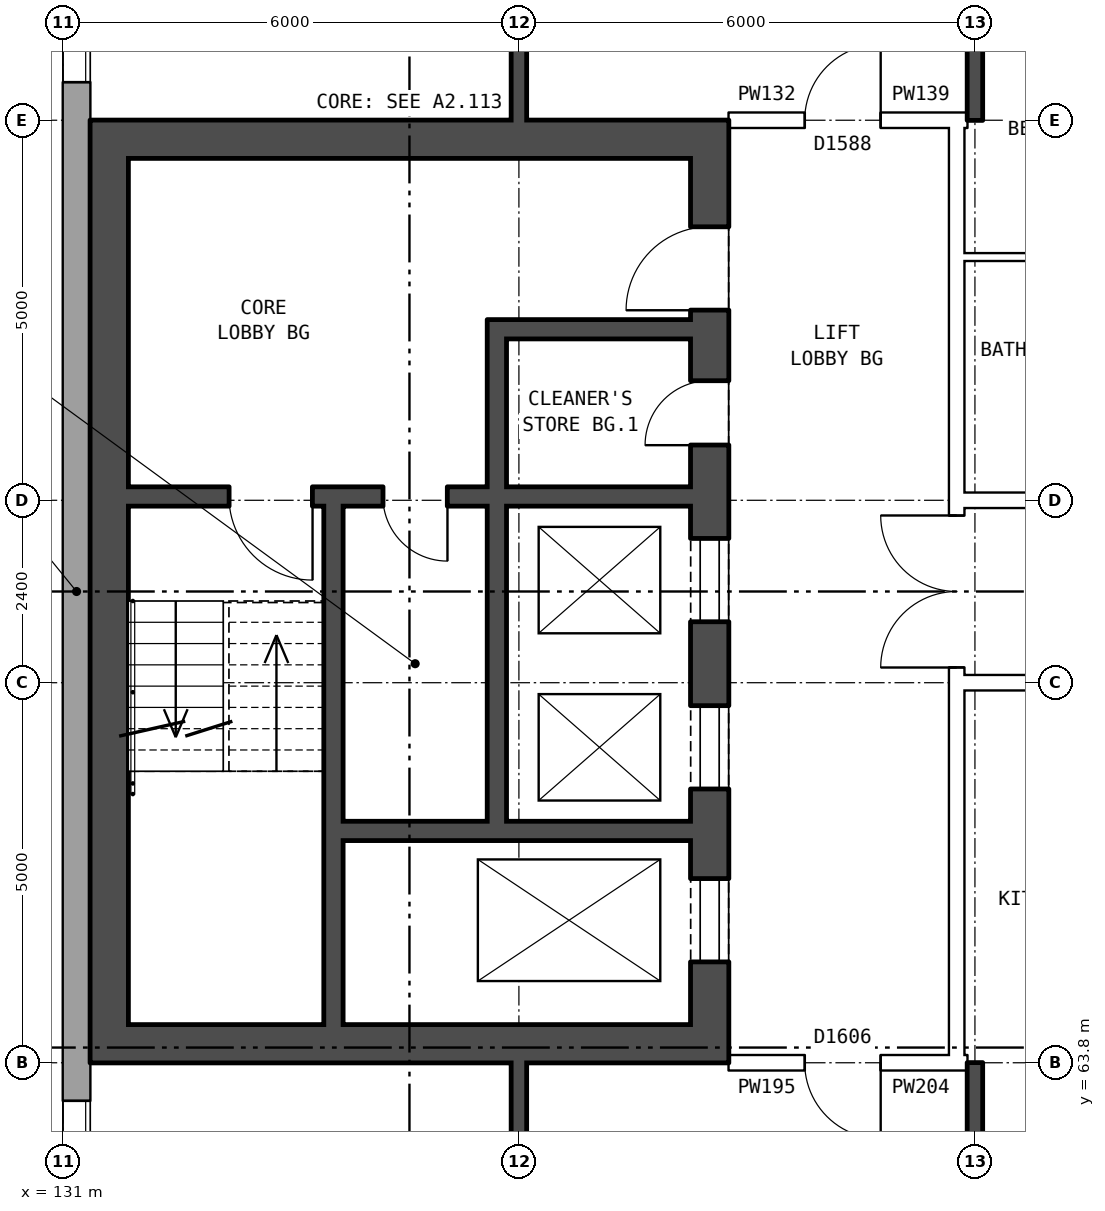
"""IFC4 building model, lengths in metres.
Left out: names, types, materials, properties, quantities, classifications, styles, units other than length and angle.
Written with IfcOpenShell. Run it as: python <this file> out.ifc"""

import sys

from ifc_helpers import new_model, si_unit, direction, frame, frame_2d, origin, place, context, subcontext, project, spatial, rectangle, extrude, element, fill, save


model = new_model("IFC4")
c1 = context("Model", 3, precision=1e-05, world=origin(), true_north=direction((0.0, 1.0)))
c2 = subcontext(c1, "Body", "Model", "MODEL_VIEW")
j1 = project(units=[si_unit("LENGTHUNIT", "METRE"), si_unit("PLANEANGLEUNIT", "RADIAN")], contexts=[c1])
p1 = place(None, origin())
s1 = spatial("IfcSite", under=j1, at=p1, CompositionType="ELEMENT")
p2 = place(p1, origin())
s2 = spatial("IfcBuilding", under=s1, at=p2, CompositionType="ELEMENT")
p3 = place(p2, frame((0.0, 0.0, 154.7)))
s3 = spatial("IfcBuildingStorey", under=s2, at=p3, CompositionType="ELEMENT", Elevation=154.7)
p4 = place(p3, frame((131.18, 82.925, 0.0), z_axis=(0.0, 0.0, 1.0), x_axis=(0.0, -1.0, 0.0)))
e1 = element("IfcWall", 1, at=p4, inside=s3, PredefinedType="STANDARD", context=c2, shape_type="SweptSolid", body=[
    extrude(rectangle(XDim=25.851, YDim=0.36, at=frame_2d((12.925, 0.0))), origin(), (0.0, 0.0, 1.0), 2.85),
])
p5 = place(p4, frame((1.625, 0.0, 0.8)))
e2 = element("IfcOpeningElement", 2, at=p5, cuts=e1, PredefinedType="OPENING", context=c2, shape_type="SweptSolid", body=[
    extrude(rectangle(XDim=1.6, YDim=1.8, at=frame_2d((0.8, 0.9))), frame((0.0, 0.19, 0.0), z_axis=(0.0, -1.0, 0.0), x_axis=(1.0, 0.0, 0.0)), (0.0, 0.0, 1.0), 0.38),
])
p6 = place(p4, frame((4.625, 0.0, 0.8)))
e3 = element("IfcOpeningElement", 3, at=p6, cuts=e1, PredefinedType="OPENING", context=c2, shape_type="SweptSolid", body=[
    extrude(rectangle(XDim=1.6, YDim=1.8, at=frame_2d((0.8, 0.9))), frame((0.0, 0.19, 0.0), z_axis=(0.0, -1.0, 0.0), x_axis=(1.0, 0.0, 0.0)), (0.0, 0.0, 1.0), 0.38),
])
p7 = place(p4, frame((19.625, 0.0, 0.8)))
e4 = element("IfcOpeningElement", 4, at=p7, cuts=e1, PredefinedType="OPENING", context=c2, shape_type="SweptSolid", body=[
    extrude(rectangle(XDim=1.6, YDim=1.8, at=frame_2d((0.8, 0.9))), frame((0.0, 0.19, 0.0), z_axis=(0.0, -1.0, 0.0), x_axis=(1.0, 0.0, 0.0)), (0.0, 0.0, 1.0), 0.38),
])
p8 = place(p4, frame((22.625, 0.0, 0.8)))
e5 = element("IfcOpeningElement", 5, at=p8, cuts=e1, PredefinedType="OPENING", context=c2, shape_type="SweptSolid", body=[
    extrude(rectangle(XDim=1.6, YDim=1.8, at=frame_2d((0.8, 0.9))), frame((0.0, 0.19, 0.0), z_axis=(0.0, -1.0, 0.0), x_axis=(1.0, 0.0, 0.0)), (0.0, 0.0, 1.0), 0.38),
])
p9 = place(p3, frame((139.51, 63.8, 0.0), z_axis=(0.0, 0.0, 1.0), x_axis=(0.0, 1.0, 0.0)))
e6 = element("IfcWall", 6, at=p9, inside=s3, PredefinedType="SHEAR", context=c2, shape_type="SweptSolid", body=[
    extrude(rectangle(XDim=12.4, YDim=0.5, at=frame_2d((6.2, 0.0))), origin(), (0.0, 0.0, 1.0), 2.85),
])
p10 = place(p9, frame((1.325, 0.0, 0.0)))
e7 = element("IfcOpeningElement", 7, at=p10, cuts=e6, PredefinedType="OPENING", context=c2, shape_type="SweptSolid", body=[
    extrude(rectangle(XDim=1.1, YDim=2.1, at=frame_2d((0.55, 1.05))), frame((0.0, 0.26, 0.0), z_axis=(0.0, -1.0, 0.0), x_axis=(1.0, 0.0, 0.0)), (0.0, 0.0, 1.0), 0.52),
])
p11 = place(p9, frame((3.6, 0.0, 0.0)))
e8 = element("IfcOpeningElement", 8, at=p11, cuts=e6, PredefinedType="OPENING", context=c2, shape_type="SweptSolid", body=[
    extrude(rectangle(XDim=1.1, YDim=2.1, at=frame_2d((0.55, 1.05))), frame((0.0, 0.26, 0.0), z_axis=(0.0, -1.0, 0.0), x_axis=(1.0, 0.0, 0.0)), (0.0, 0.0, 1.0), 0.52),
])
p12 = place(p9, frame((5.8, 0.0, 0.0)))
e9 = element("IfcOpeningElement", 9, at=p12, cuts=e6, PredefinedType="OPENING", context=c2, shape_type="SweptSolid", body=[
    extrude(rectangle(XDim=1.1, YDim=2.1, at=frame_2d((0.55, 1.05))), frame((0.0, 0.26, 0.0), z_axis=(0.0, -1.0, 0.0), x_axis=(1.0, 0.0, 0.0)), (0.0, 0.0, 1.0), 0.52),
])
p13 = place(p9, frame((9.9, 0.0, 0.0)))
e10 = element("IfcOpeningElement", 10, at=p13, cuts=e6, PredefinedType="OPENING", context=c2, shape_type="SweptSolid", body=[
    extrude(rectangle(XDim=1.1, YDim=2.1, at=frame_2d((0.55, 1.05))), frame((0.0, 0.26, 0.0), z_axis=(0.0, -1.0, 0.0), x_axis=(1.0, 0.0, 0.0)), (0.0, 0.0, 1.0), 0.52),
])
p14 = place(p9, frame((8.125, 0.0, 0.0)))
e11 = element("IfcOpeningElement", 11, at=p14, cuts=e6, PredefinedType="OPENING", context=c2, shape_type="SweptSolid", body=[
    extrude(rectangle(XDim=0.85, YDim=2.1, at=frame_2d((0.425, 1.05))), frame((0.0, 0.26, 0.0), z_axis=(0.0, -1.0, 0.0), x_axis=(1.0, 0.0, 0.0)), (0.0, 0.0, 1.0), 0.52),
])
p15 = place(p3, frame((131.61, 63.8, 0.0), z_axis=(0.0, 0.0, 1.0), x_axis=(0.0, 1.0, 0.0)))
e12 = element("IfcWall", 12, at=p15, inside=s3, PredefinedType="SHEAR", context=c2, shape_type="SweptSolid", body=[
    extrude(rectangle(XDim=12.4, YDim=0.5, at=frame_2d((6.2, 0.0))), origin(), (0.0, 0.0, 1.0), 2.85),
])
for number, where, z_axis, x_axis in (
    (13, (139.26, 64.05, 0.0), (0.0, 0.0, 1.0), (-1.0, 0.0, 0.0)),
    (14, (139.26, 75.95, 0.0), (0.0, 0.0, 1.0), (-1.0, 0.0, 0.0)),
):
    element("IfcWall", number, at=place(p3, frame(where, z_axis=z_axis, x_axis=x_axis)), inside=s3, PredefinedType="SHEAR", context=c2, shape_type="SweptSolid", body=[
        extrude(rectangle(XDim=7.4, YDim=0.5, at=frame_2d((3.7, 0.0))), origin(), (0.0, 0.0, 1.0), 2.85),
    ])
p16 = place(p3, frame((139.26, 66.85, 0.0), z_axis=(0.0, 0.0, 1.0), x_axis=(-1.0, 0.0, 0.0)))
e15 = element("IfcWall", 15, at=p16, inside=s3, PredefinedType="SHEAR", context=c2, shape_type="SweptSolid", body=[
    extrude(rectangle(XDim=4.575, YDim=0.25, at=frame_2d((2.288, 0.0))), origin(), (0.0, 0.0, 1.0), 2.85),
])
p17 = place(p3, frame((139.26, 71.25, 0.0), z_axis=(0.0, 0.0, 1.0), x_axis=(-1.0, 0.0, 0.0)))
e16 = element("IfcWall", 16, at=p17, inside=s3, PredefinedType="SHEAR", context=c2, shape_type="SweptSolid", body=[
    extrude(rectangle(XDim=7.4, YDim=0.25, at=frame_2d((3.7, 0.0))), origin(), (0.0, 0.0, 1.0), 2.85),
])
p18 = place(p17, frame((4.975, 0.0, 0.0)))
e17 = element("IfcOpeningElement", 17, at=p18, cuts=e16, PredefinedType="OPENING", context=c2, shape_type="SweptSolid", body=[
    extrude(rectangle(XDim=1.1, YDim=2.1, at=frame_2d((0.55, 1.05))), frame((0.0, 0.135, 0.0), z_axis=(0.0, -1.0, 0.0), x_axis=(1.0, 0.0, 0.0)), (0.0, 0.0, 1.0), 0.27),
])
p19 = place(p17, frame((3.2, 0.0, 0.0)))
e18 = element("IfcOpeningElement", 18, at=p19, cuts=e16, PredefinedType="OPENING", context=c2, shape_type="SweptSolid", body=[
    extrude(rectangle(XDim=0.85, YDim=2.1, at=frame_2d((0.425, 1.05))), frame((0.0, 0.135, 0.0), z_axis=(0.0, -1.0, 0.0), x_axis=(1.0, 0.0, 0.0)), (0.0, 0.0, 1.0), 0.27),
])
p20 = place(p3, frame((139.26, 73.45, 0.0), z_axis=(0.0, 0.0, 1.0), x_axis=(-1.0, 0.0, 0.0)))
e19 = element("IfcWall", 19, at=p20, inside=s3, PredefinedType="SHEAR", context=c2, shape_type="SweptSolid", body=[
    extrude(rectangle(XDim=2.425, YDim=0.25, at=frame_2d((1.212, 0.0))), origin(), (0.0, 0.0, 1.0), 2.85),
])
p21 = place(p3, frame((136.71, 66.975, 0.0), z_axis=(0.0, 0.0, 1.0), x_axis=(0.0, 1.0, 0.0)))
e20 = element("IfcWall", 20, at=p21, inside=s3, PredefinedType="SHEAR", context=c2, shape_type="SweptSolid", body=[
    extrude(rectangle(XDim=4.15, YDim=0.25, at=frame_2d((2.075, 0.0))), origin(), (0.0, 0.0, 1.0), 2.85),
])
p22 = place(p3, frame((136.71, 71.375, 0.0), z_axis=(0.0, 0.0, 1.0), x_axis=(0.0, 1.0, 0.0)))
e21 = element("IfcWall", 21, at=p22, inside=s3, PredefinedType="SHEAR", context=c2, shape_type="SweptSolid", body=[
    extrude(rectangle(XDim=2.2, YDim=0.25, at=frame_2d((1.1, 0.0))), origin(), (0.0, 0.0, 1.0), 2.85),
])
p23 = place(p3, frame((134.56, 64.3, 0.0), z_axis=(0.0, 0.0, 1.0), x_axis=(0.0, 1.0, 0.0)))
e22 = element("IfcWall", 22, at=p23, inside=s3, PredefinedType="SHEAR", context=c2, shape_type="SweptSolid", body=[
    extrude(rectangle(XDim=6.825, YDim=0.25, at=frame_2d((3.413, 0.0))), origin(), (0.0, 0.0, 1.0), 2.85),
])
p24 = place(p3, frame((142.76, 63.9, 0.0), z_axis=(0.0, 0.0, 1.0), x_axis=(0.0, 1.0, 0.0)))
e23 = element("IfcWall", 23, at=p24, inside=s3, PredefinedType="PARTITIONING", context=c2, shape_type="SweptSolid", body=[
    extrude(rectangle(XDim=12.2, YDim=0.2, at=frame_2d((6.1, 0.0))), origin(), (0.0, 0.0, 1.0), 2.85),
])
p25 = place(p24, frame((5.1, 0.0, 0.0)))
e24 = element("IfcOpeningElement", 24, at=p25, cuts=e23, PredefinedType="OPENING", context=c2, shape_type="SweptSolid", body=[
    extrude(rectangle(XDim=2.0, YDim=2.1, at=frame_2d((1.0, 1.05))), frame((0.0, 0.11, 0.0), z_axis=(0.0, -1.0, 0.0), x_axis=(1.0, 0.0, 0.0)), (0.0, 0.0, 1.0), 0.22),
])
p26 = place(p3, frame((139.76, 63.8, 0.0), z_axis=(0.0, 0.0, 1.0), x_axis=(1.0, 0.0, 0.0)))
e25 = element("IfcWall", 25, at=p26, inside=s3, PredefinedType="PARTITIONING", context=c2, shape_type="SweptSolid", body=[
    extrude(rectangle(XDim=3.0, YDim=0.2, at=frame_2d((1.5, 0.0))), origin(), (0.0, 0.0, 1.0), 2.85),
])
p27 = place(p26, frame((1.0, 0.0, 0.0)))
e26 = element("IfcOpeningElement", 26, at=p27, cuts=e25, PredefinedType="OPENING", context=c2, shape_type="SweptSolid", body=[
    extrude(rectangle(XDim=1.0, YDim=2.1, at=frame_2d((0.5, 1.05))), frame((0.0, 0.11, 0.0), z_axis=(0.0, -1.0, 0.0), x_axis=(1.0, 0.0, 0.0)), (0.0, 0.0, 1.0), 0.22),
])
p28 = place(p3, frame((142.76, 63.8, 0.0), z_axis=(0.0, 0.0, 1.0), x_axis=(1.0, 0.0, 0.0)))
e27 = element("IfcWall", 27, at=p28, inside=s3, PredefinedType="PARTITIONING", context=c2, shape_type="SweptSolid", body=[
    extrude(rectangle(XDim=0.14, YDim=0.2, at=frame_2d((0.07, 0.0))), origin(), (0.0, 0.0, 1.0), 2.85),
])
p29 = place(p3, frame((142.76, 68.8, 0.0), z_axis=(0.0, 0.0, 1.0), x_axis=(1.0, 0.0, 0.0)))
e28 = element("IfcWall", 28, at=p29, inside=s3, PredefinedType="PARTITIONING", context=c2, shape_type="SweptSolid", body=[
    extrude(rectangle(XDim=14.48, YDim=0.2, at=frame_2d((7.24, 0.0))), origin(), (0.0, 0.0, 1.0), 2.85),
])
p30 = place(p29, frame((1.12, 0.0, 0.0)))
e29 = element("IfcOpeningElement", 29, at=p30, cuts=e28, PredefinedType="OPENING", context=c2, shape_type="SweptSolid", body=[
    extrude(rectangle(XDim=1.0, YDim=2.1, at=frame_2d((0.5, 1.05))), frame((0.0, 0.11, 0.0), z_axis=(0.0, -1.0, 0.0), x_axis=(1.0, 0.0, 0.0)), (0.0, 0.0, 1.0), 0.22),
])
p31 = place(p29, frame((7.24, 0.0, 0.0)))
e30 = element("IfcOpeningElement", 30, at=p31, cuts=e28, PredefinedType="OPENING", context=c2, shape_type="SweptSolid", body=[
    extrude(rectangle(XDim=1.0, YDim=2.1, at=frame_2d((0.5, 1.05))), frame((0.0, 0.11, 0.0), z_axis=(0.0, -1.0, 0.0), x_axis=(1.0, 0.0, 0.0)), (0.0, 0.0, 1.0), 0.22),
])
p32 = place(p3, frame((142.76, 71.2, 0.0), z_axis=(0.0, 0.0, 1.0), x_axis=(1.0, 0.0, 0.0)))
e31 = element("IfcWall", 31, at=p32, inside=s3, PredefinedType="PARTITIONING", context=c2, shape_type="SweptSolid", body=[
    extrude(rectangle(XDim=14.48, YDim=0.2, at=frame_2d((7.24, 0.0))), origin(), (0.0, 0.0, 1.0), 2.85),
])
p33 = place(p32, frame((4.24, 0.0, 0.0)))
e32 = element("IfcOpeningElement", 32, at=p33, cuts=e31, PredefinedType="OPENING", context=c2, shape_type="SweptSolid", body=[
    extrude(rectangle(XDim=1.0, YDim=2.1, at=frame_2d((0.5, 1.05))), frame((0.0, 0.11, 0.0), z_axis=(0.0, -1.0, 0.0), x_axis=(1.0, 0.0, 0.0)), (0.0, 0.0, 1.0), 0.22),
])
p34 = place(p32, frame((10.24, 0.0, 0.0)))
e33 = element("IfcOpeningElement", 33, at=p34, cuts=e31, PredefinedType="OPENING", context=c2, shape_type="SweptSolid", body=[
    extrude(rectangle(XDim=1.0, YDim=2.1, at=frame_2d((0.5, 1.05))), frame((0.0, 0.11, 0.0), z_axis=(0.0, -1.0, 0.0), x_axis=(1.0, 0.0, 0.0)), (0.0, 0.0, 1.0), 0.22),
])
p35 = place(p3, frame((142.76, 74.4, 0.0), z_axis=(0.0, 0.0, 1.0), x_axis=(1.0, 0.0, 0.0)))
e34 = element("IfcWall", 34, at=p35, inside=s3, PredefinedType="PARTITIONING", context=c2, shape_type="SweptSolid", body=[
    extrude(rectangle(XDim=3.24, YDim=0.1, at=frame_2d((1.62, 0.0))), origin(), (0.0, 0.0, 1.0), 2.85),
])
p36 = place(p3, frame((139.76, 76.2, 0.0), z_axis=(0.0, 0.0, 1.0), x_axis=(1.0, 0.0, 0.0)))
e35 = element("IfcWall", 35, at=p36, inside=s3, PredefinedType="PARTITIONING", context=c2, shape_type="SweptSolid", body=[
    extrude(rectangle(XDim=3.0, YDim=0.2, at=frame_2d((1.5, 0.0))), origin(), (0.0, 0.0, 1.0), 2.85),
])
p37 = place(p36, frame((1.0, 0.0, 0.0)))
e36 = element("IfcOpeningElement", 36, at=p37, cuts=e35, PredefinedType="OPENING", context=c2, shape_type="SweptSolid", body=[
    extrude(rectangle(XDim=1.0, YDim=2.1, at=frame_2d((0.5, 1.05))), frame((0.0, 0.11, 0.0), z_axis=(0.0, -1.0, 0.0), x_axis=(1.0, 0.0, 0.0)), (0.0, 0.0, 1.0), 0.22),
])
p38 = place(p3, frame((142.76, 76.2, 0.0), z_axis=(0.0, 0.0, 1.0), x_axis=(1.0, 0.0, 0.0)))
e37 = element("IfcWall", 37, at=p38, inside=s3, PredefinedType="PARTITIONING", context=c2, shape_type="SweptSolid", body=[
    extrude(rectangle(XDim=0.14, YDim=0.2, at=frame_2d((0.07, 0.0))), origin(), (0.0, 0.0, 1.0), 2.85),
])
p39 = place(p3, frame((137.0, 54.36, 0.0), z_axis=(0.0, 0.0, 1.0), x_axis=(0.0, 1.0, 0.0)))
e38 = element("IfcWall", 38, at=p39, inside=s3, PredefinedType="SOLIDWALL", context=c2, shape_type="SweptSolid", body=[
    extrude(rectangle(XDim=9.44, YDim=0.2, at=frame_2d((4.72, 0.0))), origin(), (0.0, 0.0, 1.0), 2.85),
])
p40 = place(p39, frame((7.04, 0.0, 0.0)))
e39 = element("IfcOpeningElement", 39, at=p40, cuts=e38, PredefinedType="OPENING", context=c2, shape_type="SweptSolid", body=[
    extrude(rectangle(XDim=0.9, YDim=2.1, at=frame_2d((0.45, 1.05))), frame((0.0, 0.11, 0.0), z_axis=(0.0, -1.0, 0.0), x_axis=(1.0, 0.0, 0.0)), (0.0, 0.0, 1.0), 0.22),
])
p41 = place(p3, frame((137.0, 76.2, 0.0), z_axis=(0.0, 0.0, 1.0), x_axis=(0.0, 1.0, 0.0)))
e40 = element("IfcWall", 40, at=p41, inside=s3, PredefinedType="SOLIDWALL", context=c2, shape_type="SweptSolid", body=[
    extrude(rectangle(XDim=9.44, YDim=0.2, at=frame_2d((4.72, 0.0))), origin(), (0.0, 0.0, 1.0), 2.85),
])
p42 = place(p41, frame((7.17, 0.0, 0.0)))
e41 = element("IfcOpeningElement", 41, at=p42, cuts=e40, PredefinedType="OPENING", context=c2, shape_type="SweptSolid", body=[
    extrude(rectangle(XDim=0.9, YDim=2.1, at=frame_2d((0.45, 1.05))), frame((0.0, 0.11, 0.0), z_axis=(0.0, -1.0, 0.0), x_axis=(1.0, 0.0, 0.0)), (0.0, 0.0, 1.0), 0.22),
])
p43 = place(p41, frame((1.5, 0.0, 0.0)))
e42 = element("IfcOpeningElement", 42, at=p43, cuts=e40, PredefinedType="OPENING", context=c2, shape_type="SweptSolid", body=[
    extrude(rectangle(XDim=0.9, YDim=2.1, at=frame_2d((0.45, 1.05))), frame((0.0, 0.11, 0.0), z_axis=(0.0, -1.0, 0.0), x_axis=(1.0, 0.0, 0.0)), (0.0, 0.0, 1.0), 0.22),
])
for number, where, z_axis, x_axis in (
    (43, (143.0, 54.36, 0.0), (0.0, 0.0, 1.0), (0.0, 1.0, 0.0)),
    (44, (143.0, 76.2, 0.0), (0.0, 0.0, 1.0), (0.0, 1.0, 0.0)),
):
    element("IfcWall", number, at=place(p3, frame(where, z_axis=z_axis, x_axis=x_axis)), inside=s3, PredefinedType="SOLIDWALL", context=c2, shape_type="SweptSolid", body=[
        extrude(rectangle(XDim=9.44, YDim=0.2, at=frame_2d((4.72, 0.0))), origin(), (0.0, 0.0, 1.0), 2.85),
    ])
p44 = place(p6, origin())
e45 = element("IfcWindow", 45, at=p44, inside=s3, PartitioningType="SINGLE_PANEL", PredefinedType="WINDOW", context=c2, shape_type="SweptSolid", body=[
    extrude(rectangle(XDim=1.6, YDim=1.8, at=frame_2d((0.8, 0.9))), frame((0.0, 0.15, 0.0), z_axis=(0.0, -1.0, 0.0), x_axis=(1.0, 0.0, 0.0)), (0.0, 0.0, 1.0), 0.06),
])
fill(e3, e45)
p45 = place(p7, origin())
e46 = element("IfcWindow", 46, at=p45, inside=s3, PartitioningType="SINGLE_PANEL", PredefinedType="WINDOW", context=c2, shape_type="SweptSolid", body=[
    extrude(rectangle(XDim=1.6, YDim=1.8, at=frame_2d((0.8, 0.9))), frame((0.0, 0.15, 0.0), z_axis=(0.0, -1.0, 0.0), x_axis=(1.0, 0.0, 0.0)), (0.0, 0.0, 1.0), 0.06),
])
fill(e4, e46)
p46 = place(p10, origin())
e47 = element("IfcDoor", 47, at=p46, inside=s3, OperationType="DOUBLE_DOOR_SLIDING", PredefinedType="DOOR", context=c2, shape_type="SweptSolid", body=[
    extrude(rectangle(XDim=1.1, YDim=2.1, at=frame_2d((0.55, 1.05))), frame((0.0, 0.235, 0.0), z_axis=(0.0, -1.0, 0.0), x_axis=(1.0, 0.0, 0.0)), (0.0, 0.0, 1.0), 0.05),
])
fill(e7, e47)
p47 = place(p11, origin())
e48 = element("IfcDoor", 48, at=p47, inside=s3, OperationType="DOUBLE_DOOR_SLIDING", PredefinedType="DOOR", context=c2, shape_type="SweptSolid", body=[
    extrude(rectangle(XDim=1.1, YDim=2.1, at=frame_2d((0.55, 1.05))), frame((0.0, 0.235, 0.0), z_axis=(0.0, -1.0, 0.0), x_axis=(1.0, 0.0, 0.0)), (0.0, 0.0, 1.0), 0.05),
])
fill(e8, e48)
p48 = place(p12, origin())
e49 = element("IfcDoor", 49, at=p48, inside=s3, OperationType="DOUBLE_DOOR_SLIDING", PredefinedType="DOOR", context=c2, shape_type="SweptSolid", body=[
    extrude(rectangle(XDim=1.1, YDim=2.1, at=frame_2d((0.55, 1.05))), frame((0.0, 0.235, 0.0), z_axis=(0.0, -1.0, 0.0), x_axis=(1.0, 0.0, 0.0)), (0.0, 0.0, 1.0), 0.05),
])
fill(e9, e49)
p49 = place(p13, origin())
e50 = element("IfcDoor", 50, at=p49, inside=s3, OperationType="SINGLE_SWING_LEFT", PredefinedType="DOOR", context=c2, shape_type="SweptSolid", body=[
    extrude(rectangle(XDim=1.1, YDim=2.1, at=frame_2d((0.55, 1.05))), frame((0.0, 0.235, 0.0), z_axis=(0.0, -1.0, 0.0), x_axis=(1.0, 0.0, 0.0)), (0.0, 0.0, 1.0), 0.05),
])
fill(e10, e50)
p50 = place(p18, origin())
e51 = element("IfcDoor", 51, at=p50, inside=s3, OperationType="SINGLE_SWING_LEFT", PredefinedType="DOOR", context=c2, shape_type="SweptSolid", body=[
    extrude(rectangle(XDim=1.1, YDim=2.1, at=frame_2d((0.55, 1.05))), frame((0.0, 0.025, 0.0), z_axis=(0.0, -1.0, 0.0), x_axis=(1.0, 0.0, 0.0)), (0.0, 0.0, 1.0), 0.05),
])
fill(e17, e51)
p51 = place(p14, origin())
e52 = element("IfcDoor", 52, at=p51, inside=s3, OperationType="SINGLE_SWING_LEFT", PredefinedType="DOOR", context=c2, shape_type="SweptSolid", body=[
    extrude(rectangle(XDim=0.85, YDim=2.1, at=frame_2d((0.425, 1.05))), frame((0.0, 0.235, 0.0), z_axis=(0.0, -1.0, 0.0), x_axis=(1.0, 0.0, 0.0)), (0.0, 0.0, 1.0), 0.05),
])
fill(e11, e52)
p52 = place(p19, origin())
e53 = element("IfcDoor", 53, at=p52, inside=s3, OperationType="SINGLE_SWING_LEFT", PredefinedType="DOOR", context=c2, shape_type="SweptSolid", body=[
    extrude(rectangle(XDim=0.85, YDim=2.1, at=frame_2d((0.425, 1.05))), frame((0.0, 0.025, 0.0), z_axis=(0.0, -1.0, 0.0), x_axis=(1.0, 0.0, 0.0)), (0.0, 0.0, 1.0), 0.05),
])
fill(e18, e53)
p53 = place(p25, origin())
e54 = element("IfcDoor", 54, at=p53, inside=s3, OperationType="DOUBLE_DOOR_SINGLE_SWING", PredefinedType="DOOR", context=c2, shape_type="SweptSolid", body=[
    extrude(rectangle(XDim=2.0, YDim=2.1, at=frame_2d((1.0, 1.05))), frame((0.0, 0.025, 0.0), z_axis=(0.0, -1.0, 0.0), x_axis=(1.0, 0.0, 0.0)), (0.0, 0.0, 1.0), 0.05),
])
fill(e24, e54)
p54 = place(p27, frame((1.0, 0.0, 0.0), z_axis=(0.0, 0.0, 1.0), x_axis=(-1.0, 0.0, 0.0)))
e55 = element("IfcDoor", 55, at=p54, inside=s3, OperationType="SINGLE_SWING_LEFT", PredefinedType="DOOR", context=c2, shape_type="SweptSolid", body=[
    extrude(rectangle(XDim=1.0, YDim=2.1, at=frame_2d((0.5, 1.05))), frame((0.0, 0.025, 0.0), z_axis=(0.0, -1.0, 0.0), x_axis=(1.0, 0.0, 0.0)), (0.0, 0.0, 1.0), 0.05),
])
fill(e26, e55)
p55 = place(p37, origin())
e56 = element("IfcDoor", 56, at=p55, inside=s3, OperationType="SINGLE_SWING_RIGHT", PredefinedType="DOOR", context=c2, shape_type="SweptSolid", body=[
    extrude(rectangle(XDim=1.0, YDim=2.1, at=frame_2d((0.5, 1.05))), frame((0.0, 0.025, 0.0), z_axis=(0.0, -1.0, 0.0), x_axis=(1.0, 0.0, 0.0)), (0.0, 0.0, 1.0), 0.05),
])
fill(e36, e56)
save(model, sys.argv[1])
